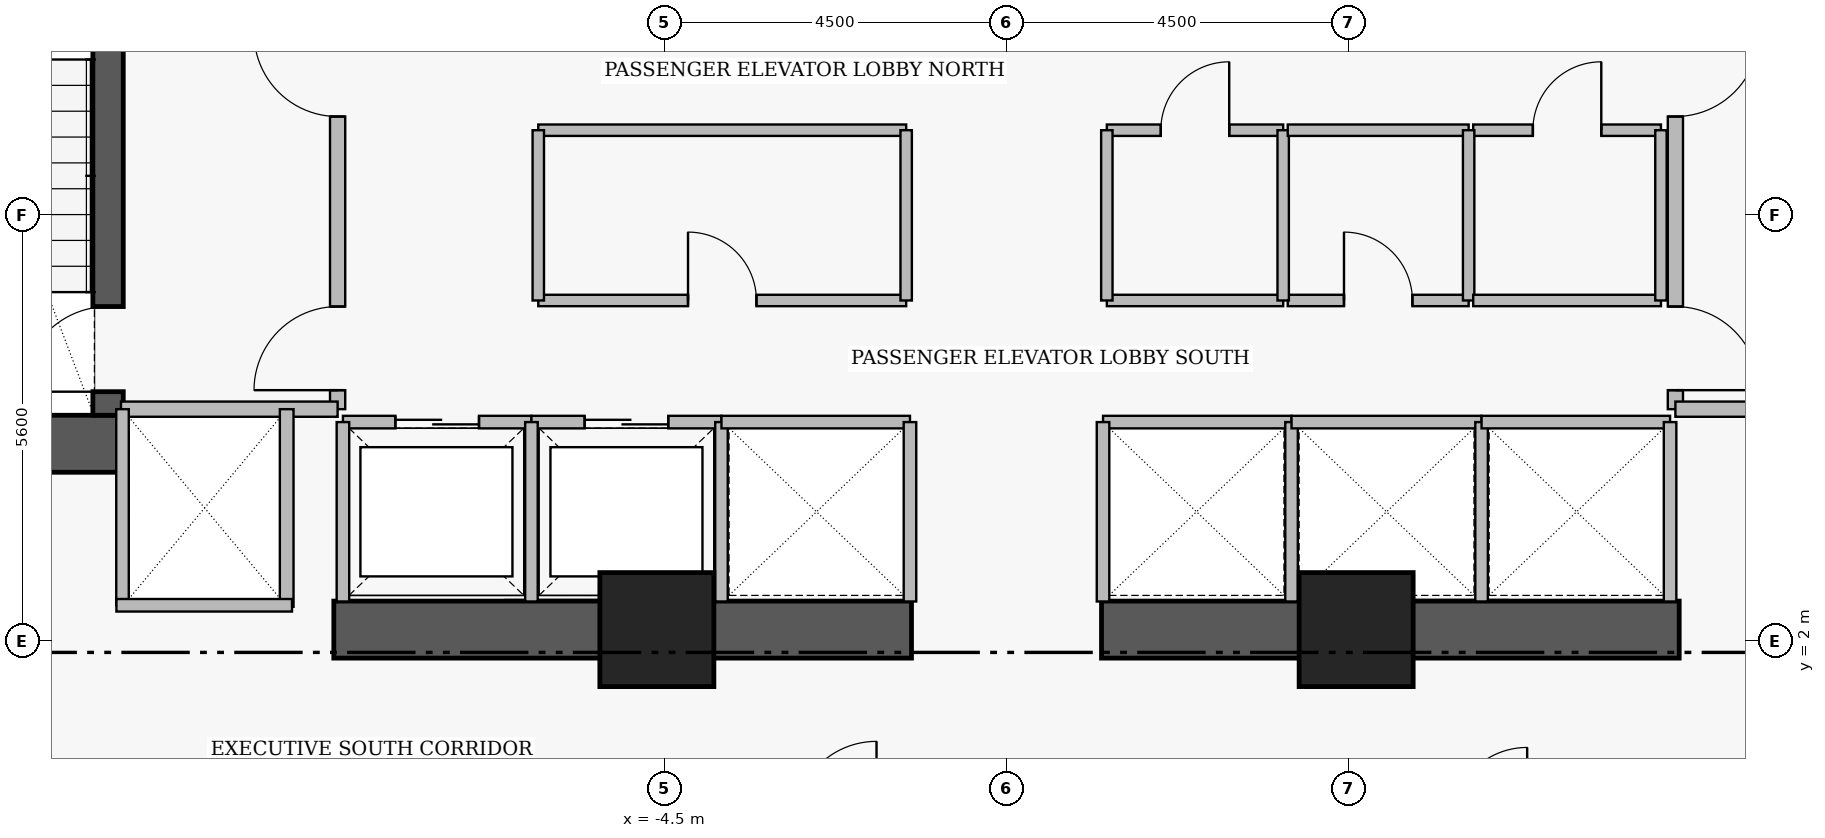
"""IFC4 building model, lengths in metres.
Left out: names, types, materials, properties, quantities, classifications, styles, units other than length and angle.
Written with IfcOpenShell. Run it as: python <this file> out.ifc"""

import sys

from ifc_helpers import new_model, si_unit, direction, frame, frame_2d, origin, origin_2d, place, context, subcontext, project, spatial, rectangle, extrude, element, fill, save


model = new_model("IFC4")
c1 = context("Model", 3, precision=1e-05, world=origin(), true_north=direction((0.0, 1.0)))
c2 = subcontext(c1, "Body", "Model", "MODEL_VIEW")
j1 = project(units=[si_unit("LENGTHUNIT", "METRE"), si_unit("PLANEANGLEUNIT", "RADIAN")], contexts=[c1])
p1 = place(None, origin())
s1 = spatial("IfcSite", under=j1, at=p1, CompositionType="ELEMENT")
p2 = place(p1, origin())
s2 = spatial("IfcBuilding", under=s1, at=p2, CompositionType="ELEMENT")
p3 = place(p2, frame((0.0, 0.0, 128.5)))
s3 = spatial("IfcBuildingStorey", under=s2, at=p3, CompositionType="ELEMENT", Elevation=128.5)
p4 = place(p3, frame((-16.16, 4.595, 0.0), z_axis=(0.0, 0.0, 1.0), x_axis=(1.0, 0.0, 0.0)))
e1 = element("IfcWall", 1, at=p4, inside=s3, PredefinedType="SHEAR", context=c2, shape_type="SweptSolid", body=[
    extrude(rectangle(XDim=4.56, YDim=0.75, at=frame_2d((2.28, 0.0))), origin(), (0.0, 0.0, 1.0), 3.46),
])
for number, where, z_axis, x_axis in (
    (2, (-8.85, 2.15, 0.0), (0.0, 0.0, 1.0), (1.0, 0.0, 0.0)),
    (3, (1.25, 2.15, 0.0), (0.0, 0.0, 1.0), (1.0, 0.0, 0.0)),
):
    element("IfcWall", number, at=place(p3, frame(where, z_axis=z_axis, x_axis=x_axis)), inside=s3, PredefinedType="SHEAR", context=c2, shape_type="SweptSolid", body=[
        extrude(rectangle(XDim=7.6, YDim=0.75, at=frame_2d((3.8, 0.0))), origin(), (0.0, 0.0, 1.0), 3.43),
    ])
p5 = place(p3, frame((-11.82, 4.97, 0.0), z_axis=(0.0, 0.0, 1.0), x_axis=(0.0, 1.0, 0.0)))
e4 = element("IfcWall", 4, at=p5, inside=s3, PredefinedType="SHEAR", context=c2, shape_type="SweptSolid", body=[
    extrude(rectangle(XDim=8.96, YDim=0.4, at=frame_2d((4.48, 0.0))), origin(), (0.0, 0.0, 1.0), 3.46),
])
p6 = place(p5, frame((0.31, 0.0, 0.0)))
e5 = element("IfcOpeningElement", 5, at=p6, cuts=e4, PredefinedType="OPENING", context=c2, shape_type="SweptSolid", body=[
    extrude(rectangle(XDim=1.12, YDim=2.22, at=frame_2d((0.56, 1.11))), frame((0.0, 0.21, 0.0), z_axis=(0.0, -1.0, 0.0), x_axis=(1.0, 0.0, 0.0)), (0.0, 0.0, 1.0), 0.42),
])
for number, where, z_axis, x_axis in (
    (6, (-4.6, 2.15, 0.0), (0.0, 0.0, 1.0), (1.0, 0.0, 0.0)),
    (7, (4.6, 2.15, 0.0), (0.0, 0.0, 1.0), (1.0, 0.0, 0.0)),
):
    element("IfcColumn", number, at=place(p3, frame(where, z_axis=z_axis, x_axis=x_axis)), inside=s3, PredefinedType="COLUMN", context=c2, shape_type="SweptSolid", body=[
        extrude(rectangle(XDim=1.5, YDim=1.5, at=origin_2d()), origin(), (0.0, 0.0, 1.0), 3.65),
    ])
p7 = place(p3, frame((-8.8, 5.05, 0.0), z_axis=(0.0, 0.0, 1.0), x_axis=(0.0, 1.0, 0.0)))
e8 = element("IfcWall", 8, at=p7, inside=s3, PredefinedType="PARTITIONING", context=c2, shape_type="SweptSolid", body=[
    extrude(rectangle(XDim=6.1, YDim=0.2, at=frame_2d((3.05, 0.0))), origin(), (0.0, 0.0, 1.0), 3.43),
])
p8 = place(p7, frame((0.25, 0.0, 0.0)))
e9 = element("IfcOpeningElement", 9, at=p8, cuts=e8, PredefinedType="OPENING", context=c2, shape_type="SweptSolid", body=[
    extrude(rectangle(XDim=1.1, YDim=2.2, at=frame_2d((0.55, 1.1))), frame((0.0, 0.11, 0.0), z_axis=(0.0, -1.0, 0.0), x_axis=(1.0, 0.0, 0.0)), (0.0, 0.0, 1.0), 0.22),
])
p9 = place(p7, frame((3.85, 0.0, 0.0)))
e10 = element("IfcOpeningElement", 10, at=p9, cuts=e8, PredefinedType="OPENING", context=c2, shape_type="SweptSolid", body=[
    extrude(rectangle(XDim=1.1, YDim=2.2, at=frame_2d((0.55, 1.1))), frame((0.0, 0.11, 0.0), z_axis=(0.0, -1.0, 0.0), x_axis=(1.0, 0.0, 0.0)), (0.0, 0.0, 1.0), 0.22),
])
p10 = place(p3, frame((8.8, 11.15, 0.0), z_axis=(0.0, 0.0, 1.0), x_axis=(0.0, -1.0, 0.0)))
e11 = element("IfcWall", 11, at=p10, inside=s3, PredefinedType="PARTITIONING", context=c2, shape_type="SweptSolid", body=[
    extrude(rectangle(XDim=6.1, YDim=0.2, at=frame_2d((3.05, 0.0))), origin(), (0.0, 0.0, 1.0), 3.43),
])
p11 = place(p10, frame((1.15, 0.0, 0.0)))
e12 = element("IfcOpeningElement", 12, at=p11, cuts=e11, PredefinedType="OPENING", context=c2, shape_type="SweptSolid", body=[
    extrude(rectangle(XDim=1.1, YDim=2.2, at=frame_2d((0.55, 1.1))), frame((0.0, 0.11, 0.0), z_axis=(0.0, -1.0, 0.0), x_axis=(1.0, 0.0, 0.0)), (0.0, 0.0, 1.0), 0.22),
])
p12 = place(p10, frame((4.75, 0.0, 0.0)))
e13 = element("IfcOpeningElement", 13, at=p12, cuts=e11, PredefinedType="OPENING", context=c2, shape_type="SweptSolid", body=[
    extrude(rectangle(XDim=1.1, YDim=2.2, at=frame_2d((0.55, 1.1))), frame((0.0, 0.11, 0.0), z_axis=(0.0, -1.0, 0.0), x_axis=(1.0, 0.0, 0.0)), (0.0, 0.0, 1.0), 0.22),
])
p13 = place(p3, frame((-8.73, 4.88, 0.0), z_axis=(0.0, 0.0, 1.0), x_axis=(1.0, 0.0, 0.0)))
e14 = element("IfcWall", 14, at=p13, inside=s3, PredefinedType="PARTITIONING", context=c2, shape_type="SweptSolid", body=[
    extrude(rectangle(XDim=2.48, YDim=0.165, at=frame_2d((1.24, 0.0))), origin(), (0.0, 0.0, 1.0), 3.43),
])
p14 = place(p13, frame((0.69, 0.0, 0.0)))
e15 = element("IfcOpeningElement", 15, at=p14, cuts=e14, PredefinedType="OPENING", context=c2, shape_type="SweptSolid", body=[
    extrude(rectangle(XDim=1.1, YDim=2.25, at=frame_2d((0.55, 1.125))), frame((0.0, 0.093, 0.0), z_axis=(0.0, -1.0, 0.0), x_axis=(1.0, 0.0, 0.0)), (0.0, 0.0, 1.0), 0.185),
])
p15 = place(p3, frame((-6.25, 4.88, 0.0), z_axis=(0.0, 0.0, 1.0), x_axis=(1.0, 0.0, 0.0)))
e16 = element("IfcWall", 16, at=p15, inside=s3, PredefinedType="PARTITIONING", context=c2, shape_type="SweptSolid", body=[
    extrude(rectangle(XDim=2.5, YDim=0.165, at=frame_2d((1.25, 0.0))), origin(), (0.0, 0.0, 1.0), 3.43),
])
p16 = place(p15, frame((0.7, 0.0, 0.0)))
e17 = element("IfcOpeningElement", 17, at=p16, cuts=e16, PredefinedType="OPENING", context=c2, shape_type="SweptSolid", body=[
    extrude(rectangle(XDim=1.1, YDim=2.25, at=frame_2d((0.55, 1.125))), frame((0.0, 0.093, 0.0), z_axis=(0.0, -1.0, 0.0), x_axis=(1.0, 0.0, 0.0)), (0.0, 0.0, 1.0), 0.185),
])
p17 = place(p3, frame((-6.16, 6.48, 0.0), z_axis=(0.0, 0.0, 1.0), x_axis=(1.0, 0.0, 0.0)))
e18 = element("IfcWall", 18, at=p17, inside=s3, PredefinedType="PARTITIONING", context=c2, shape_type="SweptSolid", body=[
    extrude(rectangle(XDim=4.84, YDim=0.15, at=frame_2d((2.42, 0.0))), origin(), (0.0, 0.0, 1.0), 3.43),
])
p18 = place(p17, frame((1.97, 0.0, 0.0)))
e19 = element("IfcOpeningElement", 19, at=p18, cuts=e18, PredefinedType="OPENING", context=c2, shape_type="SweptSolid", body=[
    extrude(rectangle(XDim=0.9, YDim=2.15, at=frame_2d((0.45, 1.075))), frame((0.0, 0.085, 0.0), z_axis=(0.0, -1.0, 0.0), x_axis=(1.0, 0.0, 0.0)), (0.0, 0.0, 1.0), 0.17),
])
p19 = place(p3, frame((1.32, 8.72, 0.0), z_axis=(0.0, 0.0, 1.0), x_axis=(1.0, 0.0, 0.0)))
e20 = element("IfcWall", 20, at=p19, inside=s3, PredefinedType="PARTITIONING", context=c2, shape_type="SweptSolid", body=[
    extrude(rectangle(XDim=2.32, YDim=0.15, at=frame_2d((1.16, 0.0))), origin(), (0.0, 0.0, 1.0), 3.43),
])
p20 = place(p19, frame((0.71, 0.0, 0.0)))
e21 = element("IfcOpeningElement", 21, at=p20, cuts=e20, PredefinedType="OPENING", context=c2, shape_type="SweptSolid", body=[
    extrude(rectangle(XDim=0.9, YDim=2.15, at=frame_2d((0.45, 1.075))), frame((0.0, 0.085, 0.0), z_axis=(0.0, -1.0, 0.0), x_axis=(1.0, 0.0, 0.0)), (0.0, 0.0, 1.0), 0.17),
])
p21 = place(p3, frame((3.7, 6.48, 0.0), z_axis=(0.0, 0.0, 1.0), x_axis=(1.0, 0.0, 0.0)))
e22 = element("IfcWall", 22, at=p21, inside=s3, PredefinedType="PARTITIONING", context=c2, shape_type="SweptSolid", body=[
    extrude(rectangle(XDim=2.38, YDim=0.15, at=frame_2d((1.19, 0.0))), origin(), (0.0, 0.0, 1.0), 3.43),
])
p22 = place(p21, frame((0.74, 0.0, 0.0)))
e23 = element("IfcOpeningElement", 23, at=p22, cuts=e22, PredefinedType="OPENING", context=c2, shape_type="SweptSolid", body=[
    extrude(rectangle(XDim=0.9, YDim=2.15, at=frame_2d((0.45, 1.075))), frame((0.0, 0.085, 0.0), z_axis=(0.0, -1.0, 0.0), x_axis=(1.0, 0.0, 0.0)), (0.0, 0.0, 1.0), 0.17),
])
p23 = place(p3, frame((6.14, 8.72, 0.0), z_axis=(0.0, 0.0, 1.0), x_axis=(1.0, 0.0, 0.0)))
e24 = element("IfcWall", 24, at=p23, inside=s3, PredefinedType="PARTITIONING", context=c2, shape_type="SweptSolid", body=[
    extrude(rectangle(XDim=2.47, YDim=0.15, at=frame_2d((1.235, 0.0))), origin(), (0.0, 0.0, 1.0), 3.43),
])
p24 = place(p23, frame((0.785, 0.0, 0.0)))
e25 = element("IfcOpeningElement", 25, at=p24, cuts=e24, PredefinedType="OPENING", context=c2, shape_type="SweptSolid", body=[
    extrude(rectangle(XDim=0.9, YDim=2.15, at=frame_2d((0.45, 1.075))), frame((0.0, 0.085, 0.0), z_axis=(0.0, -1.0, 0.0), x_axis=(1.0, 0.0, 0.0)), (0.0, 0.0, 1.0), 0.17),
])
for number, where, z_axis, x_axis in (
    (26, (-11.65, 5.05, 0.0), (0.0, 0.0, 1.0), (1.0, 0.0, 0.0)),
    (27, (8.8, 5.05, 0.0), (0.0, 0.0, 1.0), (1.0, 0.0, 0.0)),
):
    element("IfcWall", number, at=place(p3, frame(where, z_axis=z_axis, x_axis=x_axis)), inside=s3, PredefinedType="PARTITIONING", context=c2, shape_type="SweptSolid", body=[
        extrude(rectangle(XDim=2.85, YDim=0.2, at=frame_2d((1.425, 0.0))), origin(), (0.0, 0.0, 1.0), 3.43),
    ])
for number, where, z_axis, x_axis in (
    (28, (-8.73, 2.52, 0.0), (0.0, 0.0, 1.0), (0.0, 1.0, 0.0)),
    (29, (-6.25, 2.52, 0.0), (0.0, 0.0, 1.0), (0.0, 1.0, 0.0)),
    (30, (-3.75, 2.52, 0.0), (0.0, 0.0, 1.0), (0.0, 1.0, 0.0)),
):
    element("IfcWall", number, at=place(p3, frame(where, z_axis=z_axis, x_axis=x_axis)), inside=s3, PredefinedType="PARTITIONING", context=c2, shape_type="SweptSolid", body=[
        extrude(rectangle(XDim=2.36, YDim=0.165, at=frame_2d((1.18, 0.0))), origin(), (0.0, 0.0, 1.0), 3.43),
    ])
p25 = place(p3, frame((-3.75, 4.88, 0.0), z_axis=(0.0, 0.0, 1.0), x_axis=(1.0, 0.0, 0.0)))
e31 = element("IfcWall", 31, at=p25, inside=s3, PredefinedType="PARTITIONING", context=c2, shape_type="SweptSolid", body=[
    extrude(rectangle(XDim=2.48, YDim=0.165, at=frame_2d((1.24, 0.0))), origin(), (0.0, 0.0, 1.0), 3.43),
])
p26 = place(p3, frame((-1.27, 2.52, 0.0), z_axis=(0.0, 0.0, 1.0), x_axis=(0.0, 1.0, 0.0)))
e32 = element("IfcWall", 32, at=p26, inside=s3, PredefinedType="PARTITIONING", context=c2, shape_type="SweptSolid", body=[
    extrude(rectangle(XDim=2.36, YDim=0.165, at=frame_2d((1.18, 0.0))), origin(), (0.0, 0.0, 1.0), 3.43),
])
p27 = place(p3, frame((1.27, 4.88, 0.0), z_axis=(0.0, 0.0, 1.0), x_axis=(1.0, 0.0, 0.0)))
e33 = element("IfcWall", 33, at=p27, inside=s3, PredefinedType="PARTITIONING", context=c2, shape_type="SweptSolid", body=[
    extrude(rectangle(XDim=2.48, YDim=0.165, at=frame_2d((1.24, 0.0))), origin(), (0.0, 0.0, 1.0), 3.43),
])
for number, where, z_axis, x_axis in (
    (34, (1.27, 2.52, 0.0), (0.0, 0.0, 1.0), (0.0, 1.0, 0.0)),
    (35, (3.75, 2.52, 0.0), (0.0, 0.0, 1.0), (0.0, 1.0, 0.0)),
):
    element("IfcWall", number, at=place(p3, frame(where, z_axis=z_axis, x_axis=x_axis)), inside=s3, PredefinedType="PARTITIONING", context=c2, shape_type="SweptSolid", body=[
        extrude(rectangle(XDim=2.36, YDim=0.165, at=frame_2d((1.18, 0.0))), origin(), (0.0, 0.0, 1.0), 3.43),
    ])
p28 = place(p3, frame((3.75, 4.88, 0.0), z_axis=(0.0, 0.0, 1.0), x_axis=(1.0, 0.0, 0.0)))
e36 = element("IfcWall", 36, at=p28, inside=s3, PredefinedType="PARTITIONING", context=c2, shape_type="SweptSolid", body=[
    extrude(rectangle(XDim=2.5, YDim=0.165, at=frame_2d((1.25, 0.0))), origin(), (0.0, 0.0, 1.0), 3.43),
])
p29 = place(p3, frame((6.25, 2.52, 0.0), z_axis=(0.0, 0.0, 1.0), x_axis=(0.0, 1.0, 0.0)))
e37 = element("IfcWall", 37, at=p29, inside=s3, PredefinedType="PARTITIONING", context=c2, shape_type="SweptSolid", body=[
    extrude(rectangle(XDim=2.36, YDim=0.165, at=frame_2d((1.18, 0.0))), origin(), (0.0, 0.0, 1.0), 3.43),
])
p30 = place(p3, frame((6.25, 4.88, 0.0), z_axis=(0.0, 0.0, 1.0), x_axis=(1.0, 0.0, 0.0)))
e38 = element("IfcWall", 38, at=p30, inside=s3, PredefinedType="PARTITIONING", context=c2, shape_type="SweptSolid", body=[
    extrude(rectangle(XDim=2.48, YDim=0.165, at=frame_2d((1.24, 0.0))), origin(), (0.0, 0.0, 1.0), 3.43),
])
p31 = place(p3, frame((8.73, 2.52, 0.0), z_axis=(0.0, 0.0, 1.0), x_axis=(0.0, 1.0, 0.0)))
e39 = element("IfcWall", 39, at=p31, inside=s3, PredefinedType="PARTITIONING", context=c2, shape_type="SweptSolid", body=[
    extrude(rectangle(XDim=2.36, YDim=0.165, at=frame_2d((1.18, 0.0))), origin(), (0.0, 0.0, 1.0), 3.43),
])
p32 = place(p3, frame((-9.47, 2.45, 0.0), z_axis=(0.0, 0.0, 1.0), x_axis=(0.0, 1.0, 0.0)))
e40 = element("IfcWall", 40, at=p32, inside=s3, PredefinedType="PARTITIONING", context=c2, shape_type="SweptSolid", body=[
    extrude(rectangle(XDim=2.6, YDim=0.18, at=frame_2d((1.3, 0.0))), origin(), (0.0, 0.0, 1.0), 3.43),
])
p33 = place(p3, frame((-11.63, 2.47, 0.0), z_axis=(0.0, 0.0, 1.0), x_axis=(0.0, 1.0, 0.0)))
e41 = element("IfcWall", 41, at=p33, inside=s3, PredefinedType="PARTITIONING", context=c2, shape_type="SweptSolid", body=[
    extrude(rectangle(XDim=2.58, YDim=0.165, at=frame_2d((1.29, 0.0))), origin(), (0.0, 0.0, 1.0), 3.43),
])
p34 = place(p3, frame((-11.71, 2.47, 0.0), z_axis=(0.0, 0.0, 1.0), x_axis=(1.0, 0.0, 0.0)))
e42 = element("IfcWall", 42, at=p34, inside=s3, PredefinedType="PARTITIONING", context=c2, shape_type="SweptSolid", body=[
    extrude(rectangle(XDim=2.31, YDim=0.165, at=frame_2d((1.155, 0.0))), origin(), (0.0, 0.0, 1.0), 2.03),
])
p35 = place(p3, frame((-6.16, 8.72, 0.0), z_axis=(0.0, 0.0, 1.0), x_axis=(1.0, 0.0, 0.0)))
e43 = element("IfcWall", 43, at=p35, inside=s3, PredefinedType="PARTITIONING", context=c2, shape_type="SweptSolid", body=[
    extrude(rectangle(XDim=4.84, YDim=0.15, at=frame_2d((2.42, 0.0))), origin(), (0.0, 0.0, 1.0), 3.43),
])
for number, where, z_axis, x_axis in (
    (44, (-6.16, 6.48, 0.0), (0.0, 0.0, 1.0), (0.0, 1.0, 0.0)),
    (45, (-1.32, 6.48, 0.0), (0.0, 0.0, 1.0), (0.0, 1.0, 0.0)),
):
    element("IfcWall", number, at=place(p3, frame(where, z_axis=z_axis, x_axis=x_axis)), inside=s3, PredefinedType="PARTITIONING", context=c2, shape_type="SweptSolid", body=[
        extrude(rectangle(XDim=2.24, YDim=0.15, at=frame_2d((1.12, 0.0))), origin(), (0.0, 0.0, 1.0), 3.43),
    ])
p36 = place(p3, frame((1.32, 6.48, 0.0), z_axis=(0.0, 0.0, 1.0), x_axis=(1.0, 0.0, 0.0)))
e46 = element("IfcWall", 46, at=p36, inside=s3, PredefinedType="PARTITIONING", context=c2, shape_type="SweptSolid", body=[
    extrude(rectangle(XDim=2.32, YDim=0.15, at=frame_2d((1.16, 0.0))), origin(), (0.0, 0.0, 1.0), 3.43),
])
for number, where, z_axis, x_axis in (
    (47, (1.32, 6.48, 0.0), (0.0, 0.0, 1.0), (0.0, 1.0, 0.0)),
    (48, (3.64, 6.48, 0.0), (0.0, 0.0, 1.0), (0.0, 1.0, 0.0)),
):
    element("IfcWall", number, at=place(p3, frame(where, z_axis=z_axis, x_axis=x_axis)), inside=s3, PredefinedType="PARTITIONING", context=c2, shape_type="SweptSolid", body=[
        extrude(rectangle(XDim=2.24, YDim=0.15, at=frame_2d((1.12, 0.0))), origin(), (0.0, 0.0, 1.0), 3.43),
    ])
p37 = place(p3, frame((3.7, 8.72, 0.0), z_axis=(0.0, 0.0, 1.0), x_axis=(1.0, 0.0, 0.0)))
e49 = element("IfcWall", 49, at=p37, inside=s3, PredefinedType="PARTITIONING", context=c2, shape_type="SweptSolid", body=[
    extrude(rectangle(XDim=2.38, YDim=0.15, at=frame_2d((1.19, 0.0))), origin(), (0.0, 0.0, 1.0), 3.43),
])
p38 = place(p3, frame((6.08, 6.48, 0.0), z_axis=(0.0, 0.0, 1.0), x_axis=(0.0, 1.0, 0.0)))
e50 = element("IfcWall", 50, at=p38, inside=s3, PredefinedType="PARTITIONING", context=c2, shape_type="SweptSolid", body=[
    extrude(rectangle(XDim=2.24, YDim=0.15, at=frame_2d((1.12, 0.0))), origin(), (0.0, 0.0, 1.0), 3.43),
])
p39 = place(p3, frame((6.14, 6.48, 0.0), z_axis=(0.0, 0.0, 1.0), x_axis=(1.0, 0.0, 0.0)))
e51 = element("IfcWall", 51, at=p39, inside=s3, PredefinedType="PARTITIONING", context=c2, shape_type="SweptSolid", body=[
    extrude(rectangle(XDim=2.47, YDim=0.15, at=frame_2d((1.235, 0.0))), origin(), (0.0, 0.0, 1.0), 3.43),
])
p40 = place(p3, frame((8.61, 6.48, 0.0), z_axis=(0.0, 0.0, 1.0), x_axis=(0.0, 1.0, 0.0)))
e52 = element("IfcWall", 52, at=p40, inside=s3, PredefinedType="PARTITIONING", context=c2, shape_type="SweptSolid", body=[
    extrude(rectangle(XDim=2.24, YDim=0.15, at=frame_2d((1.12, 0.0))), origin(), (0.0, 0.0, 1.0), 3.43),
])
p41 = place(p6, origin())
e53 = element("IfcDoor", 53, at=p41, inside=s3, OperationType="SINGLE_SWING_LEFT", PredefinedType="DOOR", context=c2, shape_type="SweptSolid", body=[
    extrude(rectangle(XDim=1.12, YDim=2.22, at=frame_2d((0.56, 1.11))), frame((0.0, 0.025, 0.0), z_axis=(0.0, -1.0, 0.0), x_axis=(1.0, 0.0, 0.0)), (0.0, 0.0, 1.0), 0.05),
])
fill(e5, e53)
p42 = place(p8, origin())
e54 = element("IfcDoor", 54, at=p42, inside=s3, OperationType="SINGLE_SWING_LEFT", PredefinedType="DOOR", context=c2, shape_type="SweptSolid", body=[
    extrude(rectangle(XDim=1.1, YDim=2.2, at=frame_2d((0.55, 1.1))), frame((0.0, 0.025, 0.0), z_axis=(0.0, -1.0, 0.0), x_axis=(1.0, 0.0, 0.0)), (0.0, 0.0, 1.0), 0.05),
])
fill(e9, e54)
p43 = place(p9, origin())
e55 = element("IfcDoor", 55, at=p43, inside=s3, OperationType="SINGLE_SWING_RIGHT", PredefinedType="DOOR", context=c2, shape_type="SweptSolid", body=[
    extrude(rectangle(XDim=1.1, YDim=2.2, at=frame_2d((0.55, 1.1))), frame((0.0, 0.025, 0.0), z_axis=(0.0, -1.0, 0.0), x_axis=(1.0, 0.0, 0.0)), (0.0, 0.0, 1.0), 0.05),
])
fill(e10, e55)
p44 = place(p11, origin())
e56 = element("IfcDoor", 56, at=p44, inside=s3, OperationType="SINGLE_SWING_LEFT", PredefinedType="DOOR", context=c2, shape_type="SweptSolid", body=[
    extrude(rectangle(XDim=1.1, YDim=2.2, at=frame_2d((0.55, 1.1))), frame((0.0, 0.025, 0.0), z_axis=(0.0, -1.0, 0.0), x_axis=(1.0, 0.0, 0.0)), (0.0, 0.0, 1.0), 0.05),
])
fill(e12, e56)
p45 = place(p12, origin())
e57 = element("IfcDoor", 57, at=p45, inside=s3, OperationType="SINGLE_SWING_RIGHT", PredefinedType="DOOR", context=c2, shape_type="SweptSolid", body=[
    extrude(rectangle(XDim=1.1, YDim=2.2, at=frame_2d((0.55, 1.1))), frame((0.0, 0.025, 0.0), z_axis=(0.0, -1.0, 0.0), x_axis=(1.0, 0.0, 0.0)), (0.0, 0.0, 1.0), 0.05),
])
fill(e13, e57)
p46 = place(p14, origin())
e58 = element("IfcDoor", 58, at=p46, inside=s3, OperationType="SLIDING_TO_LEFT", PredefinedType="DOOR", context=c2, shape_type="SweptSolid", body=[
    extrude(rectangle(XDim=1.1, YDim=2.25, at=frame_2d((0.55, 1.125))), frame((0.0, 0.025, 0.0), z_axis=(0.0, -1.0, 0.0), x_axis=(1.0, 0.0, 0.0)), (0.0, 0.0, 1.0), 0.05),
])
fill(e15, e58)
p47 = place(p16, origin())
e59 = element("IfcDoor", 59, at=p47, inside=s3, OperationType="SLIDING_TO_LEFT", PredefinedType="DOOR", context=c2, shape_type="SweptSolid", body=[
    extrude(rectangle(XDim=1.1, YDim=2.25, at=frame_2d((0.55, 1.125))), frame((0.0, 0.025, 0.0), z_axis=(0.0, -1.0, 0.0), x_axis=(1.0, 0.0, 0.0)), (0.0, 0.0, 1.0), 0.05),
])
fill(e17, e59)
p48 = place(p18, origin())
e60 = element("IfcDoor", 60, at=p48, inside=s3, OperationType="SINGLE_SWING_LEFT", PredefinedType="DOOR", context=c2, shape_type="SweptSolid", body=[
    extrude(rectangle(XDim=0.9, YDim=2.15, at=frame_2d((0.45, 1.075))), frame((0.0, 0.025, 0.0), z_axis=(0.0, -1.0, 0.0), x_axis=(1.0, 0.0, 0.0)), (0.0, 0.0, 1.0), 0.05),
])
fill(e19, e60)
p49 = place(p20, origin())
e61 = element("IfcDoor", 61, at=p49, inside=s3, OperationType="SINGLE_SWING_RIGHT", PredefinedType="DOOR", context=c2, shape_type="SweptSolid", body=[
    extrude(rectangle(XDim=0.9, YDim=2.15, at=frame_2d((0.45, 1.075))), frame((0.0, 0.025, 0.0), z_axis=(0.0, -1.0, 0.0), x_axis=(1.0, 0.0, 0.0)), (0.0, 0.0, 1.0), 0.05),
])
fill(e21, e61)
p50 = place(p22, origin())
e62 = element("IfcDoor", 62, at=p50, inside=s3, OperationType="SINGLE_SWING_LEFT", PredefinedType="DOOR", context=c2, shape_type="SweptSolid", body=[
    extrude(rectangle(XDim=0.9, YDim=2.15, at=frame_2d((0.45, 1.075))), frame((0.0, 0.025, 0.0), z_axis=(0.0, -1.0, 0.0), x_axis=(1.0, 0.0, 0.0)), (0.0, 0.0, 1.0), 0.05),
])
fill(e23, e62)
p51 = place(p24, origin())
e63 = element("IfcDoor", 63, at=p51, inside=s3, OperationType="SINGLE_SWING_RIGHT", PredefinedType="DOOR", context=c2, shape_type="SweptSolid", body=[
    extrude(rectangle(XDim=0.9, YDim=2.15, at=frame_2d((0.45, 1.075))), frame((0.0, 0.025, 0.0), z_axis=(0.0, -1.0, 0.0), x_axis=(1.0, 0.0, 0.0)), (0.0, 0.0, 1.0), 0.05),
])
fill(e25, e63)
save(model, sys.argv[1])
